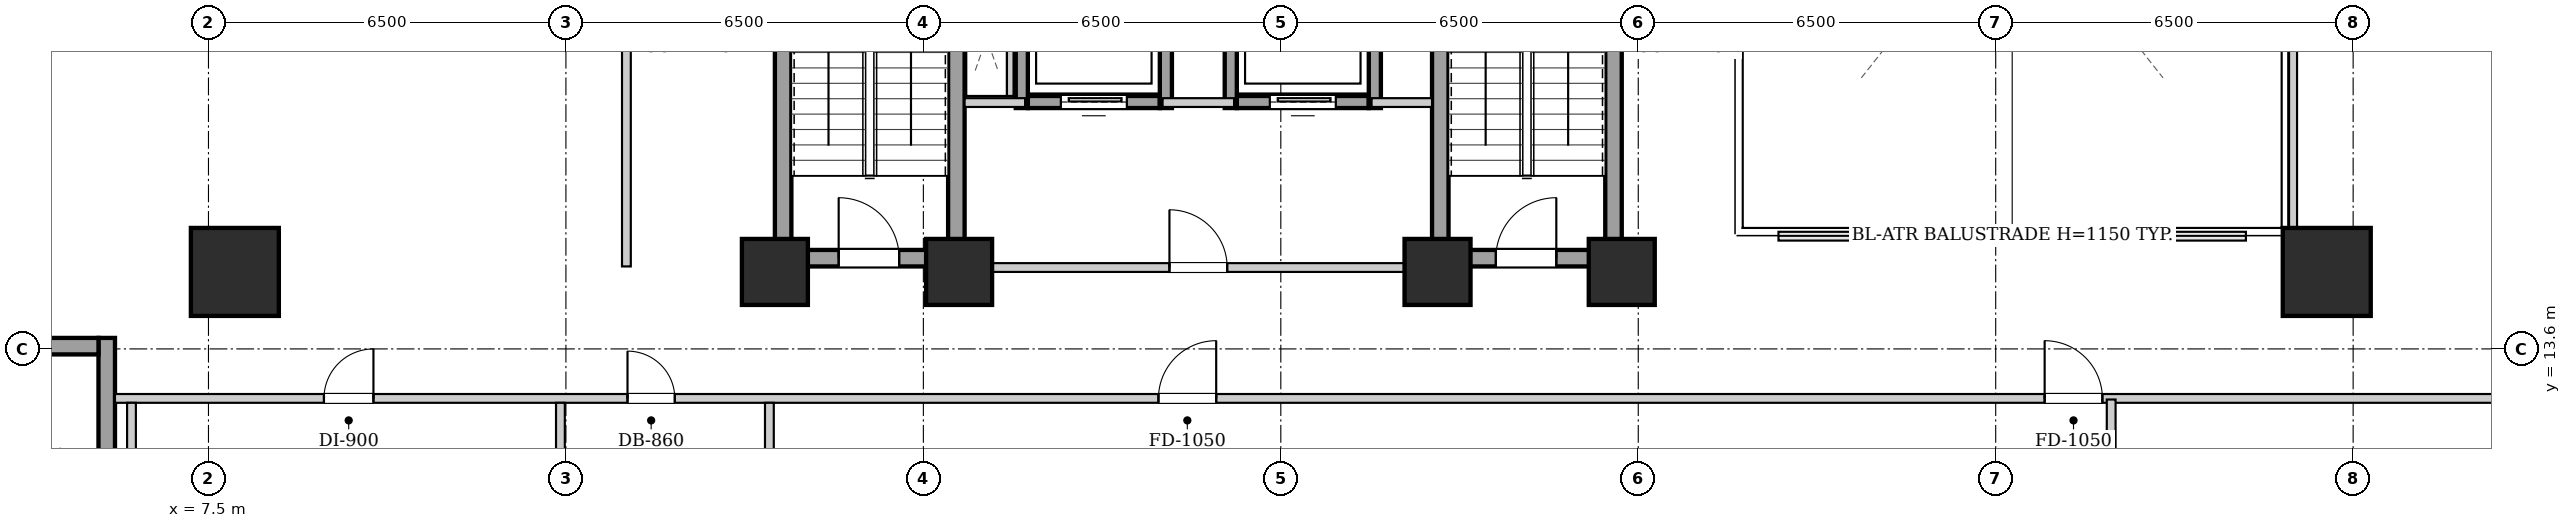
"""IFC4 building model, lengths in metres.
Left out: names, types, materials, properties, quantities, classifications, styles, units other than length and angle.
Written with IfcOpenShell. Run it as: python <this file> out.ifc"""

import sys

from ifc_helpers import new_model, si_unit, direction, frame, frame_2d, origin, origin_2d, place, context, subcontext, project, spatial, rectangle, extrude, element, fill, save


model = new_model("IFC4")
c1 = context("Model", 3, precision=1e-05, world=origin(), true_north=direction((0.0, 1.0)))
c2 = subcontext(c1, "Body", "Model", "MODEL_VIEW")
j1 = project(units=[si_unit("LENGTHUNIT", "METRE"), si_unit("PLANEANGLEUNIT", "RADIAN")], contexts=[c1])
p1 = place(None, origin())
s1 = spatial("IfcSite", under=j1, at=p1, CompositionType="ELEMENT")
p2 = place(p1, origin())
s2 = spatial("IfcBuilding", under=s1, at=p2, CompositionType="ELEMENT")
p3 = place(p2, frame((0.0, 0.0, 16.0)))
s3 = spatial("IfcBuildingStorey", under=s2, at=p3, CompositionType="ELEMENT", Elevation=16.0)
for number, where, z_axis, x_axis in (
    (1, (7.98, 15.0, 0.0), (0.0, 0.0, 1.0), (1.0, 0.0, 0.0)),
    (2, (46.02, 15.0, 0.0), (0.0, 0.0, 1.0), (1.0, 0.0, 0.0)),
):
    element("IfcColumn", number, at=place(p3, frame(where, z_axis=z_axis, x_axis=x_axis)), inside=s3, PredefinedType="COLUMN", context=c2, shape_type="SweptSolid", body=[
        extrude(rectangle(XDim=1.6, YDim=1.6, at=origin_2d()), origin(), (0.0, 0.0, 1.0), 4.8),
    ])
for number, where, z_axis, x_axis in (
    (3, (17.8, 15.0, 0.0), (0.0, 0.0, 1.0), (1.0, 0.0, 0.0)),
    (4, (21.15, 15.0, 0.0), (0.0, 0.0, 1.0), (1.0, 0.0, 0.0)),
    (5, (29.85, 15.0, 0.0), (0.0, 0.0, 1.0), (1.0, 0.0, 0.0)),
    (6, (33.2, 15.0, 0.0), (0.0, 0.0, 1.0), (1.0, 0.0, 0.0)),
):
    element("IfcColumn", number, at=place(p3, frame(where, z_axis=z_axis, x_axis=x_axis)), inside=s3, PredefinedType="COLUMN", context=c2, shape_type="SweptSolid", body=[
        extrude(rectangle(XDim=1.2, YDim=1.2, at=origin_2d()), origin(), (0.0, 0.0, 1.0), 4.8),
    ])
for number, where, z_axis, x_axis in (
    (7, (17.95, 15.1, 0.0), (0.0, 0.0, 1.0), (0.0, 1.0, 0.0)),
    (8, (21.1, 15.1, 0.0), (0.0, 0.0, 1.0), (0.0, 1.0, 0.0)),
):
    element("IfcWall", number, at=place(p3, frame(where, z_axis=z_axis, x_axis=x_axis)), inside=s3, PredefinedType="SHEAR", context=c2, shape_type="SweptSolid", body=[
        extrude(rectangle(XDim=9.0, YDim=0.3, at=frame_2d((4.5, 0.0))), origin(), (0.0, 0.0, 1.0), 4.35),
    ])
p4 = place(p3, frame((18.1, 15.25, 0.0), z_axis=(0.0, 0.0, 1.0), x_axis=(1.0, 0.0, 0.0)))
e9 = element("IfcWall", 9, at=p4, inside=s3, PredefinedType="SHEAR", context=c2, shape_type="SweptSolid", body=[
    extrude(rectangle(XDim=2.85, YDim=0.3, at=frame_2d((1.425, 0.0))), origin(), (0.0, 0.0, 1.0), 4.35),
])
p5 = place(p4, frame((0.86, 0.0, 0.0)))
e10 = element("IfcOpeningElement", 10, at=p5, cuts=e9, PredefinedType="OPENING", context=c2, shape_type="SweptSolid", body=[
    extrude(rectangle(XDim=1.1, YDim=2.05, at=frame_2d((0.55, 1.025))), frame((0.0, 0.16, 0.0), z_axis=(0.0, -1.0, 0.0), x_axis=(1.0, 0.0, 0.0)), (0.0, 0.0, 1.0), 0.32),
])
for number, where, z_axis, x_axis in (
    (11, (29.9, 15.1, 0.0), (0.0, 0.0, 1.0), (0.0, 1.0, 0.0)),
    (12, (33.05, 15.1, 0.0), (0.0, 0.0, 1.0), (0.0, 1.0, 0.0)),
):
    element("IfcWall", number, at=place(p3, frame(where, z_axis=z_axis, x_axis=x_axis)), inside=s3, PredefinedType="SHEAR", context=c2, shape_type="SweptSolid", body=[
        extrude(rectangle(XDim=9.0, YDim=0.3, at=frame_2d((4.5, 0.0))), origin(), (0.0, 0.0, 1.0), 4.35),
    ])
p6 = place(p3, frame((30.05, 15.25, 0.0), z_axis=(0.0, 0.0, 1.0), x_axis=(1.0, 0.0, 0.0)))
e13 = element("IfcWall", 13, at=p6, inside=s3, PredefinedType="SHEAR", context=c2, shape_type="SweptSolid", body=[
    extrude(rectangle(XDim=2.85, YDim=0.3, at=frame_2d((1.425, 0.0))), origin(), (0.0, 0.0, 1.0), 4.35),
])
p7 = place(p6, frame((0.86, 0.0, 0.0)))
e14 = element("IfcOpeningElement", 14, at=p7, cuts=e13, PredefinedType="OPENING", context=c2, shape_type="SweptSolid", body=[
    extrude(rectangle(XDim=1.1, YDim=2.05, at=frame_2d((0.55, 1.025))), frame((0.0, 0.16, 0.0), z_axis=(0.0, -1.0, 0.0), x_axis=(1.0, 0.0, 0.0)), (0.0, 0.0, 1.0), 0.32),
])
p8 = place(p3, frame((5.65, 4.0, 0.0), z_axis=(0.0, 0.0, 1.0), x_axis=(0.0, 1.0, 0.0)))
e15 = element("IfcWall", 15, at=p8, inside=s3, PredefinedType="SHEAR", context=c2, shape_type="SweptSolid", body=[
    extrude(rectangle(XDim=9.8, YDim=0.3, at=frame_2d((4.9, 0.0))), origin(), (0.0, 0.0, 1.0), 4.35),
])
p9 = place(p3, frame((2.35, 13.65, 0.0), z_axis=(0.0, 0.0, 1.0), x_axis=(1.0, 0.0, 0.0)))
e16 = element("IfcWall", 16, at=p9, inside=s3, PredefinedType="SHEAR", context=c2, shape_type="SweptSolid", body=[
    extrude(rectangle(XDim=3.15, YDim=0.3, at=frame_2d((1.575, 0.0))), origin(), (0.0, 0.0, 1.0), 4.35),
])
p10 = place(p3, frame((22.4, 18.09, 0.0), z_axis=(0.0, 0.0, 1.0), x_axis=(1.0, 0.0, 0.0)))
e17 = element("IfcWall", 17, at=p10, inside=s3, PredefinedType="SHEAR", context=c2, shape_type="SweptSolid", body=[
    extrude(rectangle(XDim=2.4, YDim=0.22, at=frame_2d((1.2, 0.0))), origin(), (0.0, 0.0, 1.0), 4.35),
])
p11 = place(p10, frame((0.6, 0.0, 0.0)))
e18 = element("IfcOpeningElement", 18, at=p11, cuts=e17, PredefinedType="OPENING", context=c2, shape_type="SweptSolid", body=[
    extrude(rectangle(XDim=1.2, YDim=2.15, at=frame_2d((0.6, 1.075))), frame((0.0, 0.12, 0.0), z_axis=(0.0, -1.0, 0.0), x_axis=(1.0, 0.0, 0.0)), (0.0, 0.0, 1.0), 0.24),
])
for number, where, z_axis, x_axis in (
    (19, (22.29, 17.98, 0.0), (0.0, 0.0, 1.0), (0.0, 1.0, 0.0)),
    (20, (24.91, 17.98, 0.0), (0.0, 0.0, 1.0), (0.0, 1.0, 0.0)),
):
    element("IfcWall", number, at=place(p3, frame(where, z_axis=z_axis, x_axis=x_axis)), inside=s3, PredefinedType="SHEAR", context=c2, shape_type="SweptSolid", body=[
        extrude(rectangle(XDim=2.54, YDim=0.22, at=frame_2d((1.27, 0.0))), origin(), (0.0, 0.0, 1.0), 4.35),
    ])
p12 = place(p3, frame((26.2, 18.09, 0.0), z_axis=(0.0, 0.0, 1.0), x_axis=(1.0, 0.0, 0.0)))
e21 = element("IfcWall", 21, at=p12, inside=s3, PredefinedType="SHEAR", context=c2, shape_type="SweptSolid", body=[
    extrude(rectangle(XDim=2.4, YDim=0.22, at=frame_2d((1.2, 0.0))), origin(), (0.0, 0.0, 1.0), 4.35),
])
p13 = place(p12, frame((0.6, 0.0, 0.0)))
e22 = element("IfcOpeningElement", 22, at=p13, cuts=e21, PredefinedType="OPENING", context=c2, shape_type="SweptSolid", body=[
    extrude(rectangle(XDim=1.2, YDim=2.15, at=frame_2d((0.6, 1.075))), frame((0.0, 0.12, 0.0), z_axis=(0.0, -1.0, 0.0), x_axis=(1.0, 0.0, 0.0)), (0.0, 0.0, 1.0), 0.24),
])
for number, where, z_axis, x_axis in (
    (23, (26.09, 17.98, 0.0), (0.0, 0.0, 1.0), (0.0, 1.0, 0.0)),
    (24, (28.71, 17.98, 0.0), (0.0, 0.0, 1.0), (0.0, 1.0, 0.0)),
):
    element("IfcWall", number, at=place(p3, frame(where, z_axis=z_axis, x_axis=x_axis)), inside=s3, PredefinedType="SHEAR", context=c2, shape_type="SweptSolid", body=[
        extrude(rectangle(XDim=2.54, YDim=0.22, at=frame_2d((1.27, 0.0))), origin(), (0.0, 0.0, 1.0), 4.35),
    ])
p14 = place(p3, frame((21.25, 15.08, 0.0), z_axis=(0.0, 0.0, 1.0), x_axis=(1.0, 0.0, 0.0)))
e25 = element("IfcWall", 25, at=p14, inside=s3, PredefinedType="PARTITIONING", context=c2, shape_type="SweptSolid", body=[
    extrude(rectangle(XDim=8.5, YDim=0.16, at=frame_2d((4.25, 0.0))), origin(), (0.0, 0.0, 1.0), 4.35),
])
p15 = place(p14, frame((3.725, 0.0, 0.0)))
e26 = element("IfcOpeningElement", 26, at=p15, cuts=e25, PredefinedType="OPENING", context=c2, shape_type="SweptSolid", body=[
    extrude(rectangle(XDim=1.05, YDim=2.05, at=frame_2d((0.525, 1.025))), frame((0.0, 0.09, 0.0), z_axis=(0.0, -1.0, 0.0), x_axis=(1.0, 0.0, 0.0)), (0.0, 0.0, 1.0), 0.18),
])
p16 = place(p3, frame((21.25, 18.08, 0.0), z_axis=(0.0, 0.0, 1.0), x_axis=(1.0, 0.0, 0.0)))
e27 = element("IfcWall", 27, at=p16, inside=s3, PredefinedType="PARTITIONING", context=c2, shape_type="SweptSolid", body=[
    extrude(rectangle(XDim=1.1, YDim=0.16, at=frame_2d((0.55, 0.0))), origin(), (0.0, 0.0, 1.0), 4.35),
])
p17 = place(p3, frame((24.85, 18.08, 0.0), z_axis=(0.0, 0.0, 1.0), x_axis=(1.0, 0.0, 0.0)))
e28 = element("IfcWall", 28, at=p17, inside=s3, PredefinedType="PARTITIONING", context=c2, shape_type="SweptSolid", body=[
    extrude(rectangle(XDim=1.3, YDim=0.16, at=frame_2d((0.65, 0.0))), origin(), (0.0, 0.0, 1.0), 4.35),
])
p18 = place(p3, frame((28.65, 18.08, 0.0), z_axis=(0.0, 0.0, 1.0), x_axis=(1.0, 0.0, 0.0)))
e29 = element("IfcWall", 29, at=p18, inside=s3, PredefinedType="PARTITIONING", context=c2, shape_type="SweptSolid", body=[
    extrude(rectangle(XDim=1.1, YDim=0.16, at=frame_2d((0.55, 0.0))), origin(), (0.0, 0.0, 1.0), 4.35),
])
p19 = place(p3, frame((22.08, 18.2, 0.0), z_axis=(0.0, 0.0, 1.0), x_axis=(0.0, 1.0, 0.0)))
e30 = element("IfcWall", 30, at=p19, inside=s3, PredefinedType="PARTITIONING", context=c2, shape_type="SweptSolid", body=[
    extrude(rectangle(XDim=2.12, YDim=0.12, at=frame_2d((1.06, 0.0))), origin(), (0.0, 0.0, 1.0), 4.35),
])
p20 = place(p3, frame((5.8, 12.7, 0.0), z_axis=(0.0, 0.0, 1.0), x_axis=(1.0, 0.0, 0.0)))
e31 = element("IfcWall", 31, at=p20, inside=s3, PredefinedType="PARTITIONING", context=c2, shape_type="SweptSolid", body=[
    extrude(rectangle(XDim=47.92, YDim=0.16, at=frame_2d((23.96, 0.0))), origin(), (0.0, 0.0, 1.0), 4.35),
])
p21 = place(p20, frame((3.8, 0.0, 0.0)))
e32 = element("IfcOpeningElement", 32, at=p21, cuts=e31, PredefinedType="OPENING", context=c2, shape_type="SweptSolid", body=[
    extrude(rectangle(XDim=0.9, YDim=2.05, at=frame_2d((0.45, 1.025))), frame((0.0, 0.09, 0.0), z_axis=(0.0, -1.0, 0.0), x_axis=(1.0, 0.0, 0.0)), (0.0, 0.0, 1.0), 0.18),
])
p22 = place(p20, frame((9.32, 0.0, 0.0)))
e33 = element("IfcOpeningElement", 33, at=p22, cuts=e31, PredefinedType="OPENING", context=c2, shape_type="SweptSolid", body=[
    extrude(rectangle(XDim=0.86, YDim=2.05, at=frame_2d((0.43, 1.025))), frame((0.0, 0.09, 0.0), z_axis=(0.0, -1.0, 0.0), x_axis=(1.0, 0.0, 0.0)), (0.0, 0.0, 1.0), 0.18),
])
p23 = place(p20, frame((18.975, 0.0, 0.0)))
e34 = element("IfcOpeningElement", 34, at=p23, cuts=e31, PredefinedType="OPENING", context=c2, shape_type="SweptSolid", body=[
    extrude(rectangle(XDim=1.05, YDim=2.05, at=frame_2d((0.525, 1.025))), frame((0.0, 0.09, 0.0), z_axis=(0.0, -1.0, 0.0), x_axis=(1.0, 0.0, 0.0)), (0.0, 0.0, 1.0), 0.18),
])
p24 = place(p20, frame((35.09, 0.0, 0.0)))
e35 = element("IfcOpeningElement", 35, at=p24, cuts=e31, PredefinedType="OPENING", context=c2, shape_type="SweptSolid", body=[
    extrude(rectangle(XDim=1.05, YDim=2.05, at=frame_2d((0.525, 1.025))), frame((0.0, 0.09, 0.0), z_axis=(0.0, -1.0, 0.0), x_axis=(1.0, 0.0, 0.0)), (0.0, 0.0, 1.0), 0.18),
])
p25 = place(p3, frame((6.1, 6.1, 0.0), z_axis=(0.0, 0.0, 1.0), x_axis=(0.0, 1.0, 0.0)))
e36 = element("IfcWall", 36, at=p25, inside=s3, PredefinedType="PARTITIONING", context=c2, shape_type="SweptSolid", body=[
    extrude(rectangle(XDim=6.52, YDim=0.16, at=frame_2d((3.26, 0.0))), origin(), (0.0, 0.0, 1.0), 4.35),
])
p26 = place(p3, frame((13.9, 6.18, 0.0), z_axis=(0.0, 0.0, 1.0), x_axis=(0.0, 1.0, 0.0)))
e37 = element("IfcWall", 37, at=p26, inside=s3, PredefinedType="PARTITIONING", context=c2, shape_type="SweptSolid", body=[
    extrude(rectangle(XDim=6.44, YDim=0.16, at=frame_2d((3.22, 0.0))), origin(), (0.0, 0.0, 1.0), 4.35),
])
p27 = place(p3, frame((17.7, 0.6, 0.0), z_axis=(0.0, 0.0, 1.0), x_axis=(0.0, 1.0, 0.0)))
e38 = element("IfcWall", 38, at=p27, inside=s3, PredefinedType="PARTITIONING", context=c2, shape_type="SweptSolid", body=[
    extrude(rectangle(XDim=12.02, YDim=0.16, at=frame_2d((6.01, 0.0))), origin(), (0.0, 0.0, 1.0), 3.435),
])
p28 = place(p3, frame((15.1, 15.1, 0.0), z_axis=(0.0, 0.0, 1.0), x_axis=(0.0, 1.0, 0.0)))
e39 = element("IfcWall", 39, at=p28, inside=s3, PredefinedType="PARTITIONING", context=c2, shape_type="SweptSolid", body=[
    extrude(rectangle(XDim=13.8, YDim=0.16, at=frame_2d((6.9, 0.0))), origin(), (0.0, 0.0, 1.0), 4.35),
])
p29 = place(p28, frame((6.475, 0.0, 0.0)))
e40 = element("IfcOpeningElement", 40, at=p29, cuts=e39, PredefinedType="OPENING", context=c2, shape_type="SweptSolid", body=[
    extrude(rectangle(XDim=1.05, YDim=2.05, at=frame_2d((0.525, 1.025))), frame((0.0, 0.09, 0.0), z_axis=(0.0, -1.0, 0.0), x_axis=(1.0, 0.0, 0.0)), (0.0, 0.0, 1.0), 0.18),
])
p30 = place(p3, frame((45.4, 15.1, 0.0), z_axis=(0.0, 0.0, 1.0), x_axis=(0.0, 1.0, 0.0)))
e41 = element("IfcWall", 41, at=p30, inside=s3, PredefinedType="PARTITIONING", context=c2, shape_type="SweptSolid", body=[
    extrude(rectangle(XDim=13.78, YDim=0.16, at=frame_2d((6.89, 0.0))), origin(), (0.0, 0.0, 1.0), 4.35),
])
p31 = place(p3, frame((42.1, 0.28, 0.0), z_axis=(0.0, 0.0, 1.0), x_axis=(0.0, 1.0, 0.0)))
e42 = element("IfcWall", 42, at=p31, inside=s3, PredefinedType="PARTITIONING", context=c2, shape_type="SweptSolid", body=[
    extrude(rectangle(XDim=12.4, YDim=0.16, at=frame_2d((6.2, 0.0))), origin(), (0.0, 0.0, 1.0), 4.35),
])
p32 = place(p31, frame((4.55, 0.0, 0.0)))
e43 = element("IfcOpeningElement", 43, at=p32, cuts=e42, PredefinedType="OPENING", context=c2, shape_type="SweptSolid", body=[
    extrude(rectangle(XDim=0.9, YDim=2.05, at=frame_2d((0.45, 1.025))), frame((0.0, 0.09, 0.0), z_axis=(0.0, -1.0, 0.0), x_axis=(1.0, 0.0, 0.0)), (0.0, 0.0, 1.0), 0.18),
])
p33 = place(p5, origin())
e44 = element("IfcDoor", 44, at=p33, inside=s3, OperationType="SINGLE_SWING_LEFT", PredefinedType="DOOR", context=c2, shape_type="SweptSolid", body=[
    extrude(rectangle(XDim=1.1, YDim=2.05, at=frame_2d((0.55, 1.025))), frame((0.0, 0.025, 0.0), z_axis=(0.0, -1.0, 0.0), x_axis=(1.0, 0.0, 0.0)), (0.0, 0.0, 1.0), 0.05),
])
fill(e10, e44)
p34 = place(p7, origin())
e45 = element("IfcDoor", 45, at=p34, inside=s3, OperationType="SINGLE_SWING_RIGHT", PredefinedType="DOOR", context=c2, shape_type="SweptSolid", body=[
    extrude(rectangle(XDim=1.1, YDim=2.05, at=frame_2d((0.55, 1.025))), frame((0.0, 0.025, 0.0), z_axis=(0.0, -1.0, 0.0), x_axis=(1.0, 0.0, 0.0)), (0.0, 0.0, 1.0), 0.05),
])
fill(e14, e45)
p35 = place(p11, origin())
e46 = element("IfcDoor", 46, at=p35, inside=s3, OperationType="SLIDING_TO_LEFT", PredefinedType="DOOR", context=c2, shape_type="SweptSolid", body=[
    extrude(rectangle(XDim=1.2, YDim=2.15, at=frame_2d((0.6, 1.075))), frame((0.0, 0.025, 0.0), z_axis=(0.0, -1.0, 0.0), x_axis=(1.0, 0.0, 0.0)), (0.0, 0.0, 1.0), 0.05),
])
fill(e18, e46)
p36 = place(p13, origin())
e47 = element("IfcDoor", 47, at=p36, inside=s3, OperationType="SLIDING_TO_LEFT", PredefinedType="DOOR", context=c2, shape_type="SweptSolid", body=[
    extrude(rectangle(XDim=1.2, YDim=2.15, at=frame_2d((0.6, 1.075))), frame((0.0, 0.025, 0.0), z_axis=(0.0, -1.0, 0.0), x_axis=(1.0, 0.0, 0.0)), (0.0, 0.0, 1.0), 0.05),
])
fill(e22, e47)
p37 = place(p15, origin())
e48 = element("IfcDoor", 48, at=p37, inside=s3, OperationType="SINGLE_SWING_LEFT", PredefinedType="DOOR", context=c2, shape_type="SweptSolid", body=[
    extrude(rectangle(XDim=1.05, YDim=2.05, at=frame_2d((0.525, 1.025))), frame((0.0, 0.025, 0.0), z_axis=(0.0, -1.0, 0.0), x_axis=(1.0, 0.0, 0.0)), (0.0, 0.0, 1.0), 0.05),
])
fill(e26, e48)
p38 = place(p21, origin())
e49 = element("IfcDoor", 49, at=p38, inside=s3, OperationType="SINGLE_SWING_RIGHT", PredefinedType="DOOR", context=c2, shape_type="SweptSolid", body=[
    extrude(rectangle(XDim=0.9, YDim=2.05, at=frame_2d((0.45, 1.025))), frame((0.0, 0.025, 0.0), z_axis=(0.0, -1.0, 0.0), x_axis=(1.0, 0.0, 0.0)), (0.0, 0.0, 1.0), 0.05),
])
fill(e32, e49)
p39 = place(p22, origin())
e50 = element("IfcDoor", 50, at=p39, inside=s3, OperationType="SINGLE_SWING_LEFT", PredefinedType="DOOR", context=c2, shape_type="SweptSolid", body=[
    extrude(rectangle(XDim=0.86, YDim=2.05, at=frame_2d((0.43, 1.025))), frame((0.0, 0.025, 0.0), z_axis=(0.0, -1.0, 0.0), x_axis=(1.0, 0.0, 0.0)), (0.0, 0.0, 1.0), 0.05),
])
fill(e33, e50)
p40 = place(p23, origin())
e51 = element("IfcDoor", 51, at=p40, inside=s3, OperationType="SINGLE_SWING_RIGHT", PredefinedType="DOOR", context=c2, shape_type="SweptSolid", body=[
    extrude(rectangle(XDim=1.05, YDim=2.05, at=frame_2d((0.525, 1.025))), frame((0.0, 0.025, 0.0), z_axis=(0.0, -1.0, 0.0), x_axis=(1.0, 0.0, 0.0)), (0.0, 0.0, 1.0), 0.05),
])
fill(e34, e51)
p41 = place(p24, origin())
e52 = element("IfcDoor", 52, at=p41, inside=s3, OperationType="SINGLE_SWING_LEFT", PredefinedType="DOOR", context=c2, shape_type="SweptSolid", body=[
    extrude(rectangle(XDim=1.05, YDim=2.05, at=frame_2d((0.525, 1.025))), frame((0.0, 0.025, 0.0), z_axis=(0.0, -1.0, 0.0), x_axis=(1.0, 0.0, 0.0)), (0.0, 0.0, 1.0), 0.05),
])
fill(e35, e52)
save(model, sys.argv[1])
